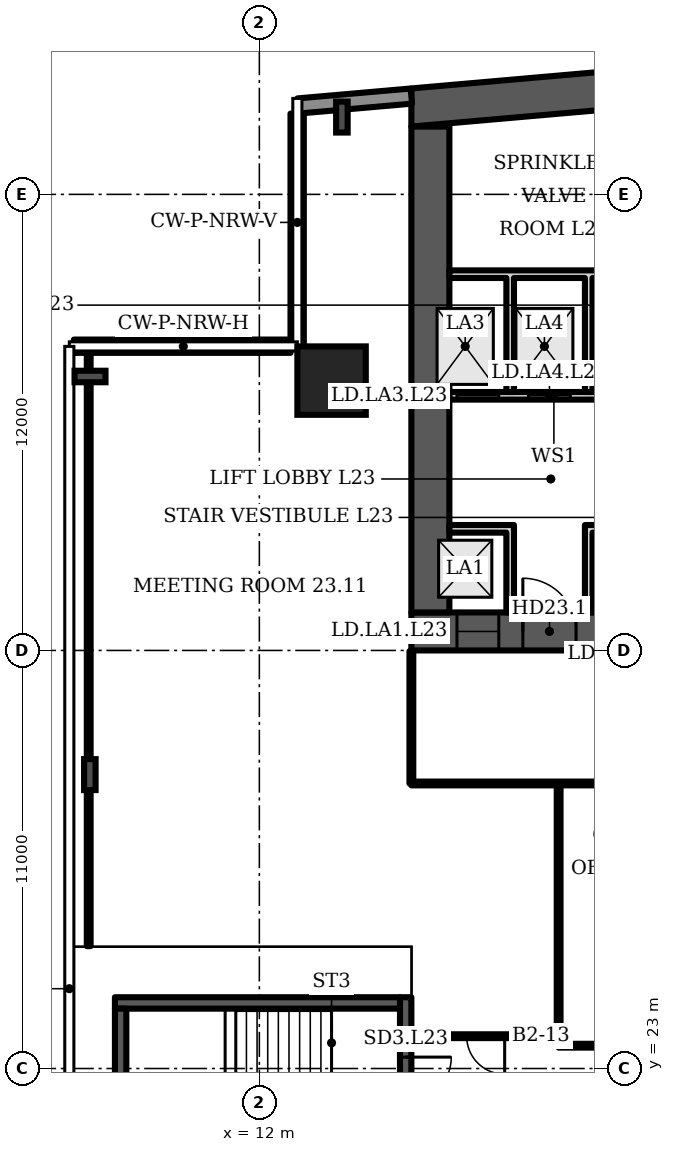
"""IFC4 building model, lengths in metres.
Left out: names, types, materials, properties, quantities, classifications, styles, units other than length and angle.
Written with IfcOpenShell. Run it as: python <this file> out.ifc"""

import sys

from ifc_helpers import new_model, si_unit, direction, frame, frame_2d, origin, origin_2d, place, context, subcontext, project, spatial, polyline, rectangle, i_section, outline, extrude, element, fill, save


model = new_model("IFC4")
c1 = context("Model", 3, precision=1e-05, world=origin(), true_north=direction((0.0, 1.0)))
c2 = subcontext(c1, "Body", "Model", "MODEL_VIEW")
j1 = project(units=[si_unit("LENGTHUNIT", "METRE"), si_unit("PLANEANGLEUNIT", "RADIAN")], contexts=[c1])
p1 = place(None, origin())
s1 = spatial("IfcSite", under=j1, at=p1, CompositionType="ELEMENT")
p2 = place(p1, origin())
s2 = spatial("IfcBuilding", under=s1, at=p2, CompositionType="ELEMENT")
p3 = place(p2, frame((0.0, 0.0, 103.9)))
s3 = spatial("IfcBuildingStorey", under=s2, at=p3, CompositionType="ELEMENT", Elevation=103.9)
p4 = place(p3, origin())
e1 = element("IfcWall", 1, at=p4, inside=s3, PredefinedType="SHEAR", context=c2, shape_type="SweptSolid", body=[
    extrude(outline(polyline([(16.0, 47.784), (40.5, 49.927), (65.0, 47.784), (65.0, 48.787), (40.5, 50.931), (16.0, 48.787), (16.0, 47.784)])), origin(), (0.0, 0.0, 1.0), 3.6),
])
p5 = place(p3, frame((16.0, 34.5, 0.0), z_axis=(0.0, 0.0, 1.0), x_axis=(1.0, 0.0, 0.0)))
e2 = element("IfcWall", 2, at=p5, inside=s3, PredefinedType="SHEAR", context=c2, shape_type="SweptSolid", body=[
    extrude(rectangle(XDim=49.0, YDim=1.0, at=frame_2d((24.5, 0.0))), origin(), (0.0, 0.0, 1.0), 3.6),
])
p6 = place(p5, frame((1.2, 0.0, 0.0)))
e3 = element("IfcOpeningElement", 3, at=p6, cuts=e2, PredefinedType="OPENING", context=c2, shape_type="SweptSolid", body=[
    extrude(rectangle(XDim=1.1, YDim=2.1, at=frame_2d((0.55, 1.05))), frame((0.0, 0.51, 0.0), z_axis=(0.0, -1.0, 0.0), x_axis=(1.0, 0.0, 0.0)), (0.0, 0.0, 1.0), 1.02),
])
p7 = place(p5, frame((5.083, 0.0, 0.0)))
e4 = element("IfcOpeningElement", 4, at=p7, cuts=e2, PredefinedType="OPENING", context=c2, shape_type="SweptSolid", body=[
    extrude(rectangle(XDim=1.1, YDim=2.1, at=frame_2d((0.55, 1.05))), frame((0.0, 0.51, 0.0), z_axis=(0.0, -1.0, 0.0), x_axis=(1.0, 0.0, 0.0)), (0.0, 0.0, 1.0), 1.02),
])
p8 = place(p5, frame((2.933, 0.0, 0.0)))
e5 = element("IfcOpeningElement", 5, at=p8, cuts=e2, PredefinedType="OPENING", context=c2, shape_type="SweptSolid", body=[
    extrude(rectangle(XDim=1.4, YDim=2.1, at=frame_2d((0.7, 1.05))), frame((0.0, 0.51, 0.0), z_axis=(0.0, -1.0, 0.0), x_axis=(1.0, 0.0, 0.0)), (0.0, 0.0, 1.0), 1.02),
])
p9 = place(p5, frame((7.65, 0.0, 0.0)))
e6 = element("IfcOpeningElement", 6, at=p9, cuts=e2, PredefinedType="OPENING", context=c2, shape_type="SweptSolid", body=[
    extrude(rectangle(XDim=1.2, YDim=2.1, at=frame_2d((0.6, 1.05))), frame((0.0, 0.51, 0.0), z_axis=(0.0, -1.0, 0.0), x_axis=(1.0, 0.0, 0.0)), (0.0, 0.0, 1.0), 1.02),
])
p10 = place(p5, frame((14.817, 0.0, 0.0)))
e7 = element("IfcOpeningElement", 7, at=p10, cuts=e2, PredefinedType="OPENING", context=c2, shape_type="SweptSolid", body=[
    extrude(rectangle(XDim=1.1, YDim=2.1, at=frame_2d((0.55, 1.05))), frame((0.0, 0.51, 0.0), z_axis=(0.0, -1.0, 0.0), x_axis=(1.0, 0.0, 0.0)), (0.0, 0.0, 1.0), 1.02),
])
p11 = place(p5, frame((19.083, 0.0, 0.0)))
e8 = element("IfcOpeningElement", 8, at=p11, cuts=e2, PredefinedType="OPENING", context=c2, shape_type="SweptSolid", body=[
    extrude(rectangle(XDim=1.1, YDim=2.1, at=frame_2d((0.55, 1.05))), frame((0.0, 0.51, 0.0), z_axis=(0.0, -1.0, 0.0), x_axis=(1.0, 0.0, 0.0)), (0.0, 0.0, 1.0), 1.02),
])
p12 = place(p5, frame((16.8, 0.0, 0.0)))
e9 = element("IfcOpeningElement", 9, at=p12, cuts=e2, PredefinedType="OPENING", context=c2, shape_type="SweptSolid", body=[
    extrude(rectangle(XDim=1.4, YDim=2.1, at=frame_2d((0.7, 1.05))), frame((0.0, 0.51, 0.0), z_axis=(0.0, -1.0, 0.0), x_axis=(1.0, 0.0, 0.0)), (0.0, 0.0, 1.0), 1.02),
])
p13 = place(p5, frame((21.817, 0.0, 0.0)))
e10 = element("IfcOpeningElement", 10, at=p13, cuts=e2, PredefinedType="OPENING", context=c2, shape_type="SweptSolid", body=[
    extrude(rectangle(XDim=1.1, YDim=2.1, at=frame_2d((0.55, 1.05))), frame((0.0, 0.51, 0.0), z_axis=(0.0, -1.0, 0.0), x_axis=(1.0, 0.0, 0.0)), (0.0, 0.0, 1.0), 1.02),
])
p14 = place(p5, frame((26.083, 0.0, 0.0)))
e11 = element("IfcOpeningElement", 11, at=p14, cuts=e2, PredefinedType="OPENING", context=c2, shape_type="SweptSolid", body=[
    extrude(rectangle(XDim=1.1, YDim=2.1, at=frame_2d((0.55, 1.05))), frame((0.0, 0.51, 0.0), z_axis=(0.0, -1.0, 0.0), x_axis=(1.0, 0.0, 0.0)), (0.0, 0.0, 1.0), 1.02),
])
p15 = place(p5, frame((33.15, 0.0, 0.0)))
e12 = element("IfcOpeningElement", 12, at=p15, cuts=e2, PredefinedType="OPENING", context=c2, shape_type="SweptSolid", body=[
    extrude(rectangle(XDim=1.2, YDim=2.1, at=frame_2d((0.6, 1.05))), frame((0.0, 0.51, 0.0), z_axis=(0.0, -1.0, 0.0), x_axis=(1.0, 0.0, 0.0)), (0.0, 0.0, 1.0), 1.02),
])
p16 = place(p5, frame((37.8, 0.0, 0.0)))
e13 = element("IfcOpeningElement", 13, at=p16, cuts=e2, PredefinedType="OPENING", context=c2, shape_type="SweptSolid", body=[
    extrude(rectangle(XDim=1.4, YDim=2.1, at=frame_2d((0.7, 1.05))), frame((0.0, 0.51, 0.0), z_axis=(0.0, -1.0, 0.0), x_axis=(1.0, 0.0, 0.0)), (0.0, 0.0, 1.0), 1.02),
])
p17 = place(p5, frame((42.817, 0.0, 0.0)))
e14 = element("IfcOpeningElement", 14, at=p17, cuts=e2, PredefinedType="OPENING", context=c2, shape_type="SweptSolid", body=[
    extrude(rectangle(XDim=1.1, YDim=2.1, at=frame_2d((0.55, 1.05))), frame((0.0, 0.51, 0.0), z_axis=(0.0, -1.0, 0.0), x_axis=(1.0, 0.0, 0.0)), (0.0, 0.0, 1.0), 1.02),
])
p18 = place(p5, frame((46.7, 0.0, 0.0)))
e15 = element("IfcOpeningElement", 15, at=p18, cuts=e2, PredefinedType="OPENING", context=c2, shape_type="SweptSolid", body=[
    extrude(rectangle(XDim=1.1, YDim=2.1, at=frame_2d((0.55, 1.05))), frame((0.0, 0.51, 0.0), z_axis=(0.0, -1.0, 0.0), x_axis=(1.0, 0.0, 0.0)), (0.0, 0.0, 1.0), 1.02),
])
p19 = place(p5, frame((44.667, 0.0, 0.0)))
e16 = element("IfcOpeningElement", 16, at=p19, cuts=e2, PredefinedType="OPENING", context=c2, shape_type="SweptSolid", body=[
    extrude(rectangle(XDim=1.4, YDim=2.1, at=frame_2d((0.7, 1.05))), frame((0.0, 0.51, 0.0), z_axis=(0.0, -1.0, 0.0), x_axis=(1.0, 0.0, 0.0)), (0.0, 0.0, 1.0), 1.02),
])
p20 = place(p3, frame((16.5, 35.0, 0.0), z_axis=(0.0, 0.0, 1.0), x_axis=(0.0, 1.0, 0.0)))
e17 = element("IfcWall", 17, at=p20, inside=s3, PredefinedType="SHEAR", context=c2, shape_type="SweptSolid", body=[
    extrude(rectangle(XDim=12.784, YDim=1.0, at=frame_2d((6.392, 0.0))), origin(), (0.0, 0.0, 1.0), 3.6),
])
p21 = place(p3, frame((13.9, 41.1, 0.0), z_axis=(0.0, 0.0, 1.0), x_axis=(1.0, 0.0, 0.0)))
e18 = element("IfcColumn", 18, at=p21, inside=s3, PredefinedType="COLUMN", context=c2, shape_type="SweptSolid", body=[
    extrude(rectangle(XDim=1.8, YDim=1.8, at=origin_2d()), origin(), (0.0, 0.0, 1.0), 3.6),
])
for number, where, z_axis, x_axis in (
    (19, (14.172, 48.034, 0.0), (0.0, 0.0, 1.0), (-1.0, 0.0, 0.0)),
    (20, (7.544, 41.208, 0.0), (0.0, 0.0, 1.0), (0.0, 1.0, 0.0)),
    (21, (7.54, 30.733, 0.0), (0.0, 0.0, 1.0), (-1.0, 0.0, 0.0)),
):
    element("IfcColumn", number, at=place(p3, frame(where, z_axis=z_axis, x_axis=x_axis)), inside=s3, PredefinedType="COLUMN", context=c2, shape_type="SweptSolid", body=[
        extrude(i_section(OverallWidth=0.303, OverallDepth=0.814, WebThickness=0.021, FlangeThickness=0.04, FilletRadius=0.03, at=origin_2d()), origin(), (0.0, 0.0, 1.0), 3.6),
    ])
p22 = place(p3, frame((16.0, 48.587, 0.0), z_axis=(0.0, 0.0, 1.0), x_axis=(-0.996194, -0.087168, 0.0)))
e22 = element("IfcWall", 22, at=p22, inside=s3, PredefinedType="SOLIDWALL", context=c2, shape_type="SweptSolid", body=[
    extrude(rectangle(XDim=2.994, YDim=0.4, at=frame_2d((1.497, 0.0))), origin(), (0.0, 0.0, 1.0), 3.2),
])
p23 = place(p3, frame((12.995, 48.126, 0.0), z_axis=(0.0, 0.0, 1.0), x_axis=(0.0, -1.0, 0.0)))
e23 = element("IfcWall", 23, at=p23, inside=s3, PredefinedType="SOLIDWALL", context=c2, shape_type="SweptSolid", body=[
    extrude(rectangle(XDim=6.126, YDim=0.35, at=frame_2d((3.063, 0.0))), origin(), (0.0, 0.0, 1.0), 1.0),
])
p24 = place(p3, frame((12.82, 42.005, 0.0), z_axis=(0.0, 0.0, 1.0), x_axis=(-1.0, 0.0, 0.0)))
e24 = element("IfcWall", 24, at=p24, inside=s3, PredefinedType="SOLIDWALL", context=c2, shape_type="SweptSolid", body=[
    extrude(rectangle(XDim=5.7, YDim=0.35, at=frame_2d((2.85, 0.0))), origin(), (0.0, 0.0, 1.0), 1.0),
])
p25 = place(p3, frame((17.0, 40.7, 0.0), z_axis=(0.0, 0.0, 1.0), x_axis=(1.0, 0.0, 0.0)))
e25 = element("IfcWall", 25, at=p25, inside=s3, PredefinedType="PARTITIONING", context=c2, shape_type="SweptSolid", body=[
    extrude(rectangle(XDim=5.5, YDim=0.2, at=frame_2d((2.75, 0.0))), origin(), (0.0, 0.0, 1.0), 3.2),
])
p26 = place(p25, frame((0.2, 0.0, 0.0)))
e26 = element("IfcOpeningElement", 26, at=p26, cuts=e25, PredefinedType="OPENING", context=c2, shape_type="SweptSolid", body=[
    extrude(rectangle(XDim=1.1, YDim=2.1, at=frame_2d((0.55, 1.05))), frame((0.0, 0.11, 0.0), z_axis=(0.0, -1.0, 0.0), x_axis=(1.0, 0.0, 0.0)), (0.0, 0.0, 1.0), 0.22),
])
p27 = place(p25, frame((2.083, 0.0, 0.0)))
e27 = element("IfcOpeningElement", 27, at=p27, cuts=e25, PredefinedType="OPENING", context=c2, shape_type="SweptSolid", body=[
    extrude(rectangle(XDim=1.1, YDim=2.1, at=frame_2d((0.55, 1.05))), frame((0.0, 0.11, 0.0), z_axis=(0.0, -1.0, 0.0), x_axis=(1.0, 0.0, 0.0)), (0.0, 0.0, 1.0), 0.22),
])
p28 = place(p25, frame((4.083, 0.0, 0.0)))
e28 = element("IfcOpeningElement", 28, at=p28, cuts=e25, PredefinedType="OPENING", context=c2, shape_type="SweptSolid", body=[
    extrude(rectangle(XDim=1.1, YDim=2.1, at=frame_2d((0.55, 1.05))), frame((0.0, 0.11, 0.0), z_axis=(0.0, -1.0, 0.0), x_axis=(1.0, 0.0, 0.0)), (0.0, 0.0, 1.0), 0.22),
])
p29 = place(p3, origin())
e29 = element("IfcWall", 29, at=p29, inside=s3, PredefinedType="PARTITIONING", context=c2, shape_type="SweptSolid", body=[
    extrude(outline(polyline([(18.5, 37.1), (17.0, 37.1), (17.0, 37.3), (18.5, 37.3), (18.7, 37.3), (18.7, 35.0), (18.5, 35.0), (18.5, 37.1)])), origin(), (0.0, 0.0, 1.0), 3.2),
])
p30 = place(p3, origin())
e30 = element("IfcWall", 30, at=p30, inside=s3, PredefinedType="PARTITIONING", context=c2, shape_type="SweptSolid", body=[
    extrude(outline(polyline([(20.567, 37.3), (20.767, 37.3), (22.5, 37.3), (22.5, 37.1), (20.767, 37.1), (20.767, 35.0), (20.567, 35.0), (20.567, 37.3)])), origin(), (0.0, 0.0, 1.0), 3.2),
])
p31 = place(p3, origin())
e31 = element("IfcWall", 31, at=p31, inside=s3, PredefinedType="PARTITIONING", context=c2, shape_type="SweptSolid", body=[
    extrude(outline(polyline([(18.7, 40.8), (18.5, 40.8), (18.5, 43.8), (17.0, 43.8), (17.0, 44.0), (22.5, 44.0), (22.5, 43.8), (20.767, 43.8), (20.767, 40.8), (20.567, 40.8), (20.567, 43.8), (18.7, 43.8), (18.7, 40.8)])), origin(), (0.0, 0.0, 1.0), 3.2),
])
p32 = place(p3, frame((15.85, 20.525, 0.0), z_axis=(0.0, 0.0, 1.0), x_axis=(0.0, 1.0, 0.0)))
e32 = element("IfcWall", 32, at=p32, inside=s3, PredefinedType="SHEAR", context=c2, shape_type="SweptSolid", body=[
    extrude(rectangle(XDim=4.35, YDim=0.3, at=frame_2d((2.175, 0.0))), origin(), (0.0, 0.0, 1.0), 3.2),
])
p33 = place(p32, frame((1.575, 0.0, 0.0)))
e33 = element("IfcOpeningElement", 33, at=p33, cuts=e32, PredefinedType="OPENING", context=c2, shape_type="SweptSolid", body=[
    extrude(rectangle(XDim=1.2, YDim=2.1, at=frame_2d((0.6, 1.05))), frame((0.0, 0.16, 0.0), z_axis=(0.0, -1.0, 0.0), x_axis=(1.0, 0.0, 0.0)), (0.0, 0.0, 1.0), 0.32),
])
p34 = place(p3, frame((7.51, 26.22, 0.0), z_axis=(0.0, 0.0, 1.0), x_axis=(0.0, 1.0, 0.0)))
e34 = element("IfcWall", 34, at=p34, inside=s3, PredefinedType="PARTITIONING", context=c2, shape_type="SweptSolid", body=[
    extrude(rectangle(XDim=15.76, YDim=0.1, at=frame_2d((7.88, 0.0))), origin(), (0.0, 0.0, 1.0), 2.58),
])
p35 = place(p3, frame((16.0, 30.5, 0.0), z_axis=(0.0, 0.0, 1.0), x_axis=(0.0, 1.0, 0.0)))
e35 = element("IfcWall", 35, at=p35, inside=s3, PredefinedType="PARTITIONING", context=c2, shape_type="SweptSolid", body=[
    extrude(rectangle(XDim=3.48, YDim=0.1, at=frame_2d((1.74, 0.0))), origin(), (0.0, 0.0, 1.0), 3.2),
])
p36 = place(p3, frame((16.0, 30.5, 0.0), z_axis=(0.0, 0.0, 1.0), x_axis=(1.0, 0.0, 0.0)))
e36 = element("IfcWall", 36, at=p36, inside=s3, PredefinedType="PARTITIONING", context=c2, shape_type="SweptSolid", body=[
    extrude(rectangle(XDim=20.85, YDim=0.1, at=frame_2d((10.425, 0.0))), origin(), (0.0, 0.0, 1.0), 3.2),
])
p37 = place(p36, frame((6.895, 0.0, 0.0)))
e37 = element("IfcOpeningElement", 37, at=p37, cuts=e36, PredefinedType="OPENING", context=c2, shape_type="SweptSolid", body=[
    extrude(rectangle(XDim=1.0, YDim=2.1, at=frame_2d((0.5, 1.05))), frame((0.0, 0.06, 0.0), z_axis=(0.0, -1.0, 0.0), x_axis=(1.0, 0.0, 0.0)), (0.0, 0.0, 1.0), 0.12),
])
p38 = place(p36, frame((15.37, 0.0, 0.0)))
e38 = element("IfcOpeningElement", 38, at=p38, cuts=e36, PredefinedType="OPENING", context=c2, shape_type="SweptSolid", body=[
    extrude(rectangle(XDim=1.0, YDim=2.1, at=frame_2d((0.5, 1.05))), frame((0.0, 0.06, 0.0), z_axis=(0.0, -1.0, 0.0), x_axis=(1.0, 0.0, 0.0)), (0.0, 0.0, 1.0), 0.12),
])
p39 = place(p3, frame((16.02, 23.85, 0.0), z_axis=(0.0, 0.0, 1.0), x_axis=(1.0, 0.0, 0.0)))
e39 = element("IfcWall", 39, at=p39, inside=s3, PredefinedType="PARTITIONING", context=c2, shape_type="SweptSolid", body=[
    extrude(rectangle(XDim=3.855, YDim=0.1, at=frame_2d((1.927, 0.0))), origin(), (0.0, 0.0, 1.0), 3.2),
])
p40 = place(p39, frame((1.435, 0.0, 0.0)))
e40 = element("IfcOpeningElement", 40, at=p40, cuts=e39, PredefinedType="OPENING", context=c2, shape_type="SweptSolid", body=[
    extrude(rectangle(XDim=1.0, YDim=2.1, at=frame_2d((0.5, 1.05))), frame((0.0, 0.06, 0.0), z_axis=(0.0, -1.0, 0.0), x_axis=(1.0, 0.0, 0.0)), (0.0, 0.0, 1.0), 0.12),
])
p41 = place(p3, frame((19.875, 23.6, 0.0), z_axis=(0.0, 0.0, 1.0), x_axis=(0.0, 1.0, 0.0)))
e41 = element("IfcWall", 41, at=p41, inside=s3, PredefinedType="PARTITIONING", context=c2, shape_type="SweptSolid", body=[
    extrude(rectangle(XDim=6.9, YDim=0.1, at=frame_2d((3.45, 0.0))), origin(), (0.0, 0.0, 1.0), 3.2),
])
p42 = place(p3, frame((19.875, 23.6, 0.0), z_axis=(0.0, 0.0, 1.0), x_axis=(1.0, 0.0, 0.0)))
e42 = element("IfcWall", 42, at=p42, inside=s3, PredefinedType="PARTITIONING", context=c2, shape_type="SweptSolid", body=[
    extrude(rectangle(XDim=1.325, YDim=0.1, at=frame_2d((0.663, 0.0))), origin(), (0.0, 0.0, 1.0), 3.2),
])
p43 = place(p3, frame((8.2, 24.725, 0.0), z_axis=(0.0, 0.0, 1.0), x_axis=(1.0, 0.0, 0.0)))
e43 = element("IfcWall", 43, at=p43, inside=s3, PredefinedType="SHEAR", context=c2, shape_type="SweptSolid", body=[
    extrude(rectangle(XDim=7.5, YDim=0.3, at=frame_2d((3.75, 0.0))), origin(), (0.0, 0.0, 1.0), 3.2),
])
p44 = place(p3, frame((8.35, 20.825, 0.0), z_axis=(0.0, 0.0, 1.0), x_axis=(0.0, 1.0, 0.0)))
e44 = element("IfcWall", 44, at=p44, inside=s3, PredefinedType="SHEAR", context=c2, shape_type="SweptSolid", body=[
    extrude(rectangle(XDim=3.75, YDim=0.3, at=frame_2d((1.875, 0.0))), origin(), (0.0, 0.0, 1.0), 3.2),
])
p45 = place(p6, origin())
e45 = element("IfcDoor", 45, at=p45, inside=s3, OperationType="DOUBLE_DOOR_SLIDING", PredefinedType="DOOR", context=c2, shape_type="SweptSolid", body=[
    extrude(rectangle(XDim=1.1, YDim=2.1, at=frame_2d((0.55, 1.05))), frame((0.0, 0.025, 0.0), z_axis=(0.0, -1.0, 0.0), x_axis=(1.0, 0.0, 0.0)), (0.0, 0.0, 1.0), 0.05),
])
fill(e3, e45)
p46 = place(p8, origin())
e46 = element("IfcDoor", 46, at=p46, inside=s3, OperationType="DOUBLE_DOOR_SINGLE_SWING", PredefinedType="DOOR", context=c2, shape_type="SweptSolid", body=[
    extrude(rectangle(XDim=1.4, YDim=2.1, at=frame_2d((0.7, 1.05))), frame((0.0, 0.025, 0.0), z_axis=(0.0, -1.0, 0.0), x_axis=(1.0, 0.0, 0.0)), (0.0, 0.0, 1.0), 0.05),
])
fill(e5, e46)
p47 = place(p26, origin())
e47 = element("IfcDoor", 47, at=p47, inside=s3, OperationType="DOUBLE_DOOR_SLIDING", PredefinedType="DOOR", context=c2, shape_type="SweptSolid", body=[
    extrude(rectangle(XDim=1.1, YDim=2.1, at=frame_2d((0.55, 1.05))), frame((0.0, 0.025, 0.0), z_axis=(0.0, -1.0, 0.0), x_axis=(1.0, 0.0, 0.0)), (0.0, 0.0, 1.0), 0.05),
])
fill(e26, e47)
p48 = place(p27, origin())
e48 = element("IfcDoor", 48, at=p48, inside=s3, OperationType="DOUBLE_DOOR_SLIDING", PredefinedType="DOOR", context=c2, shape_type="SweptSolid", body=[
    extrude(rectangle(XDim=1.1, YDim=2.1, at=frame_2d((0.55, 1.05))), frame((0.0, 0.025, 0.0), z_axis=(0.0, -1.0, 0.0), x_axis=(1.0, 0.0, 0.0)), (0.0, 0.0, 1.0), 0.05),
])
fill(e27, e48)
p49 = place(p33, origin())
e49 = element("IfcDoor", 49, at=p49, inside=s3, OperationType="SINGLE_SWING_RIGHT", PredefinedType="DOOR", context=c2, shape_type="SweptSolid", body=[
    extrude(rectangle(XDim=1.2, YDim=2.1, at=frame_2d((0.6, 1.05))), frame((0.0, 0.025, 0.0), z_axis=(0.0, -1.0, 0.0), x_axis=(1.0, 0.0, 0.0)), (0.0, 0.0, 1.0), 0.05),
])
fill(e33, e49)
p50 = place(p40, origin())
e50 = element("IfcDoor", 50, at=p50, inside=s3, OperationType="SINGLE_SWING_RIGHT", PredefinedType="DOOR", context=c2, shape_type="SweptSolid", body=[
    extrude(rectangle(XDim=1.0, YDim=2.1, at=frame_2d((0.5, 1.05))), frame((0.0, 0.025, 0.0), z_axis=(0.0, -1.0, 0.0), x_axis=(1.0, 0.0, 0.0)), (0.0, 0.0, 1.0), 0.05),
])
fill(e40, e50)
save(model, sys.argv[1])
